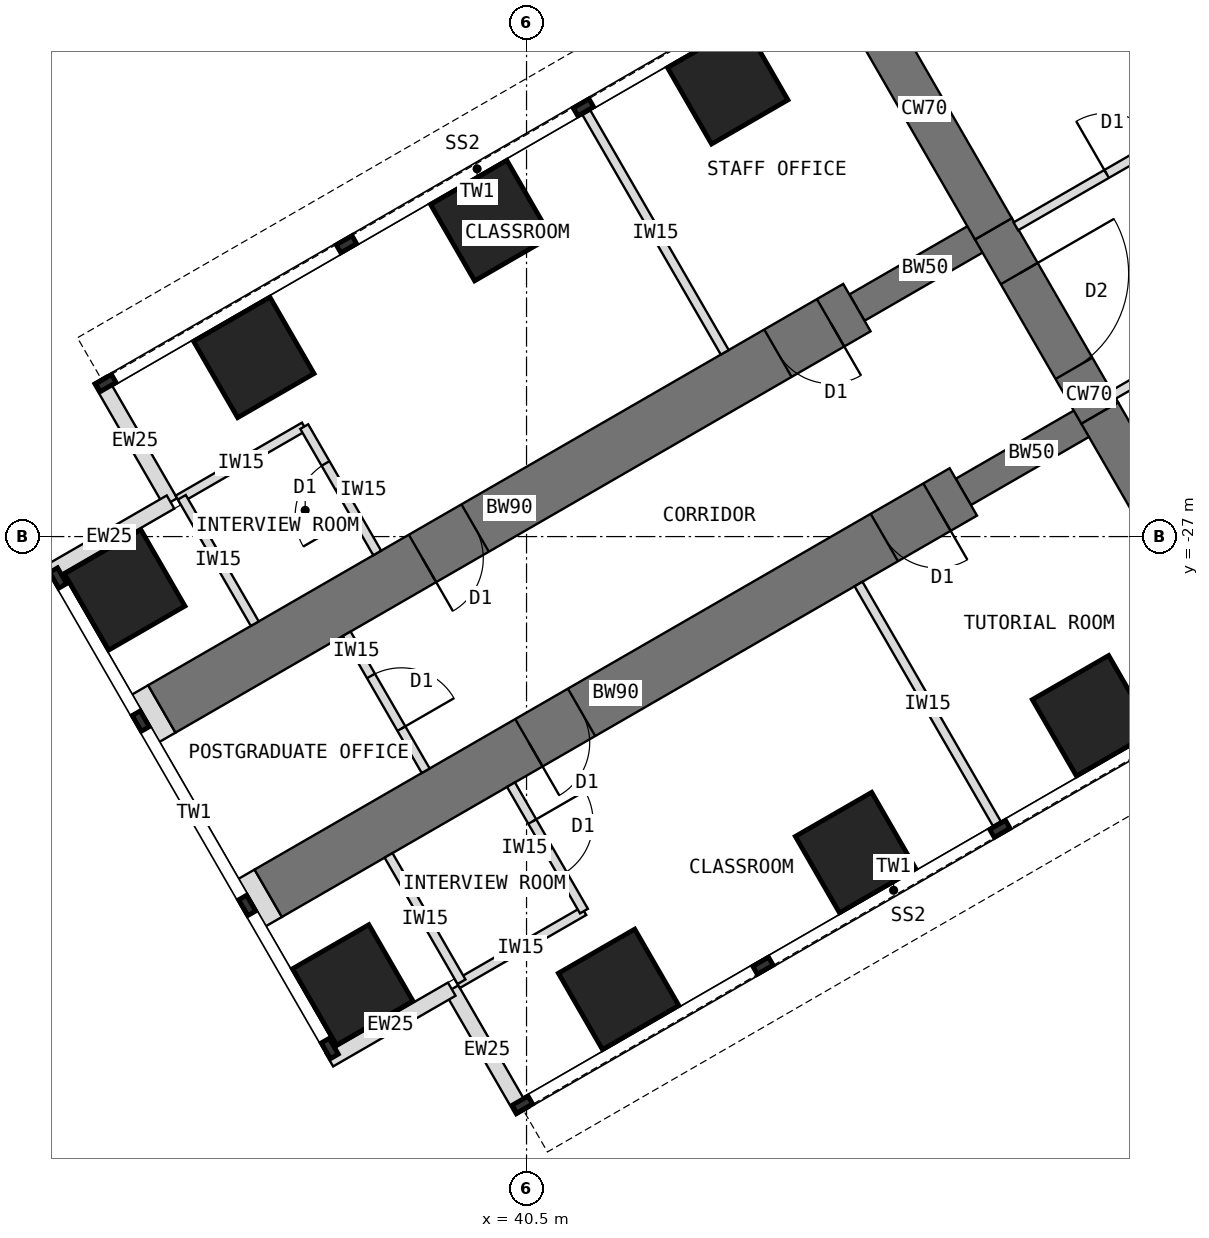
"""IFC4 building model, lengths in metres.
Left out: names, types, materials, properties, quantities, classifications, styles, units other than length and angle.
Written with IfcOpenShell. Run it as: python <this file> out.ifc"""

import sys

from ifc_helpers import new_model, si_unit, direction, frame, frame_2d, origin, origin_2d, place, context, subcontext, project, spatial, rectangle, extrude, element, fill, save


model = new_model("IFC4")
c1 = context("Model", 3, precision=1e-05, world=origin(), true_north=direction((0.0, 1.0)))
c2 = subcontext(c1, "Body", "Model", "MODEL_VIEW")
j1 = project(units=[si_unit("LENGTHUNIT", "METRE"), si_unit("PLANEANGLEUNIT", "RADIAN")], contexts=[c1])
p1 = place(None, origin())
s1 = spatial("IfcSite", under=j1, at=p1, CompositionType="ELEMENT")
p2 = place(p1, origin())
s2 = spatial("IfcBuilding", under=s1, at=p2, CompositionType="ELEMENT")
p3 = place(p2, frame((0.0, 0.0, 56.5)))
s3 = spatial("IfcBuildingStorey", under=s2, at=p3, CompositionType="ELEMENT", Elevation=56.5)
p4 = place(p3, frame((45.904, -18.0, 0.0), z_axis=(0.0, 0.0, 1.0), x_axis=(0.500024481964, -0.866011268655, 0.0)))
e1 = element("IfcWall", 1, at=p4, inside=s3, PredefinedType="SHEAR", context=c2, shape_type="SweptSolid", body=[
    extrude(rectangle(XDim=4.548, YDim=0.7, at=frame_2d((2.274, 0.0))), origin(), (0.0, 0.0, 1.0), 4.0),
])
p5 = place(p3, frame((48.178, -21.939, 0.0), z_axis=(0.0, 0.0, 1.0), x_axis=(0.500010275428, -0.866019471182, 0.0)))
e2 = element("IfcWall", 2, at=p5, inside=s3, PredefinedType="SHEAR", context=c2, shape_type="SweptSolid", body=[
    extrude(rectangle(XDim=3.5, YDim=0.7, at=frame_2d((1.75, 0.0))), origin(), (0.0, 0.0, 1.0), 4.0),
])
p6 = place(p5, frame((0.85, 0.0, 0.0)))
e3 = element("IfcOpeningElement", 3, at=p6, cuts=e2, PredefinedType="OPENING", context=c2, shape_type="SweptSolid", body=[
    extrude(rectangle(XDim=1.8, YDim=2.1, at=frame_2d((0.9, 1.05))), frame((0.0, 0.36, 0.0), z_axis=(0.0, -1.0, 0.0), x_axis=(1.0, 0.0, 0.0)), (0.0, 0.0, 1.0), 0.72),
])
p7 = place(p3, frame((49.928, -24.97, 0.0), z_axis=(0.0, 0.0, 1.0), x_axis=(0.499984222037, -0.866034513004, 0.0)))
e4 = element("IfcWall", 4, at=p7, inside=s3, PredefinedType="SHEAR", context=c2, shape_type="SweptSolid", body=[
    extrude(rectangle(XDim=4.548, YDim=0.7, at=frame_2d((2.274, 0.0))), origin(), (0.0, 0.0, 1.0), 4.0),
])
p8 = place(p3, frame((49.928, -24.97, 0.0), z_axis=(0.0, 0.0, 1.0), x_axis=(-0.866031863473, -0.499988811324, 0.0)))
e5 = element("IfcWall", 5, at=p8, inside=s3, PredefinedType="SHEAR", context=c2, shape_type="SweptSolid", body=[
    extrude(rectangle(XDim=2.592, YDim=0.5, at=frame_2d((1.296, 0.0))), origin(), (0.0, 0.0, 1.0), 4.0),
])
p9 = place(p3, frame((47.684, -26.266, 0.0), z_axis=(0.0, 0.0, 1.0), x_axis=(-0.866027579429, -0.499996231654, 0.0)))
e6 = element("IfcWall", 6, at=p9, inside=s3, PredefinedType="SHEAR", context=c2, shape_type="SweptSolid", body=[
    extrude(rectangle(XDim=13.2, YDim=0.9, at=frame_2d((6.6, 0.0))), origin(), (0.0, 0.0, 1.0), 4.0),
])
p10 = place(p9, frame((0.5, 0.0, 0.0)))
e7 = element("IfcOpeningElement", 7, at=p10, cuts=e6, PredefinedType="OPENING", context=c2, shape_type="SweptSolid", body=[
    extrude(rectangle(XDim=1.0, YDim=2.1, at=frame_2d((0.5, 1.05))), frame((0.0, 0.46, 0.0), z_axis=(0.0, -1.0, 0.0), x_axis=(1.0, 0.0, 0.0)), (0.0, 0.0, 1.0), 0.92),
])
p11 = place(p9, frame((7.25, 0.0, 0.0)))
e8 = element("IfcOpeningElement", 8, at=p11, cuts=e6, PredefinedType="OPENING", context=c2, shape_type="SweptSolid", body=[
    extrude(rectangle(XDim=1.0, YDim=2.1, at=frame_2d((0.5, 1.05))), frame((0.0, 0.46, 0.0), z_axis=(0.0, -1.0, 0.0), x_axis=(1.0, 0.0, 0.0)), (0.0, 0.0, 1.0), 0.92),
])
p12 = place(p3, frame((48.178, -21.939, 0.0), z_axis=(0.0, 0.0, 1.0), x_axis=(-0.866072649678, -0.499918158782, 0.0)))
e9 = element("IfcWall", 9, at=p12, inside=s3, PredefinedType="SHEAR", context=c2, shape_type="SweptSolid", body=[
    extrude(rectangle(XDim=2.592, YDim=0.5, at=frame_2d((1.296, 0.0))), origin(), (0.0, 0.0, 1.0), 4.0),
])
p13 = place(p3, frame((45.934, -23.234, 0.0), z_axis=(0.0, 0.0, 1.0), x_axis=(-0.866019570528, -0.500010103361, 0.0)))
e10 = element("IfcWall", 10, at=p13, inside=s3, PredefinedType="SHEAR", context=c2, shape_type="SweptSolid", body=[
    extrude(rectangle(XDim=13.2, YDim=0.9, at=frame_2d((6.6, 0.0))), origin(), (0.0, 0.0, 1.0), 4.0),
])
p14 = place(p13, frame((0.5, 0.0, 0.0)))
e11 = element("IfcOpeningElement", 11, at=p14, cuts=e10, PredefinedType="OPENING", context=c2, shape_type="SweptSolid", body=[
    extrude(rectangle(XDim=1.0, YDim=2.1, at=frame_2d((0.5, 1.05))), frame((0.0, 0.46, 0.0), z_axis=(0.0, -1.0, 0.0), x_axis=(1.0, 0.0, 0.0)), (0.0, 0.0, 1.0), 0.92),
])
p15 = place(p13, frame((7.25, 0.0, 0.0)))
e12 = element("IfcOpeningElement", 12, at=p15, cuts=e10, PredefinedType="OPENING", context=c2, shape_type="SweptSolid", body=[
    extrude(rectangle(XDim=1.0, YDim=2.1, at=frame_2d((0.5, 1.05))), frame((0.0, 0.46, 0.0), z_axis=(0.0, -1.0, 0.0), x_axis=(1.0, 0.0, 0.0)), (0.0, 0.0, 1.0), 0.92),
])
for number, where, z_axis, x_axis in (
    (13, (49.809, -29.946, 0.0), (0.0, 0.0, 1.0), (0.866, 0.5, 0.0)),
    (14, (43.809, -19.554, 0.0), (0.0, 0.0, 1.0), (0.866, 0.5, 0.0)),
    (15, (45.912, -32.196, 0.0), (0.0, 0.0, 1.0), (0.866, 0.5, 0.0)),
    (16, (39.912, -21.804, 0.0), (0.0, 0.0, 1.0), (0.866, 0.5, 0.0)),
    (17, (42.014, -34.446, 0.0), (0.0, 0.0, 1.0), (0.866, 0.5, 0.0)),
    (18, (36.014, -24.054, 0.0), (0.0, 0.0, 1.0), (0.866, 0.5, 0.0)),
    (19, (37.642, -34.373, 0.0), (0.0, 0.0, 1.0), (0.866, 0.5, 0.0)),
    (20, (33.892, -27.877, 0.0), (0.0, 0.0, 1.0), (0.866, 0.5, 0.0)),
):
    element("IfcColumn", number, at=place(p3, frame(where, z_axis=z_axis, x_axis=x_axis)), inside=s3, PredefinedType="COLUMN", context=c2, shape_type="SweptSolid", body=[
        extrude(rectangle(XDim=1.45, YDim=1.45, at=origin_2d()), origin(), (0.0, 0.0, 1.0), 4.0),
    ])
for number, where, z_axis, x_axis in (
    (21, (40.433, -36.456, 0.0), (0.0, 0.0, 1.0), (-0.5, 0.866, 0.0)),
    (22, (39.27, -34.443, 0.0), (0.0, 0.0, 1.0), (-0.866, -0.5, 0.0)),
    (23, (33.483, -24.419, 0.0), (0.0, 0.0, 1.0), (0.5, -0.866, 0.0)),
    (24, (34.645, -26.432, 0.0), (0.0, 0.0, 1.0), (-0.866, -0.5, 0.0)),
):
    element("IfcWall", number, at=place(p3, frame(where, z_axis=z_axis, x_axis=x_axis)), inside=s3, PredefinedType="STANDARD", context=c2, shape_type="SweptSolid", body=[
        extrude(rectangle(XDim=2.325, YDim=0.25, at=frame_2d((1.163, 0.0))), origin(), (0.0, 0.0, 1.0), 3.8),
    ])
for number, where, z_axis, x_axis in (
    (25, (36.252, -32.865, 0.0), (0.0, 0.0, 1.0), (-0.866, -0.5, 0.0)),
    (26, (34.502, -29.834, 0.0), (0.0, 0.0, 1.0), (-0.866, -0.5, 0.0)),
):
    element("IfcWall", number, at=place(p3, frame(where, z_axis=z_axis, x_axis=x_axis)), inside=s3, PredefinedType="PARTITIONING", context=c2, shape_type="SweptSolid", body=[
        extrude(rectangle(XDim=0.31, YDim=0.9, at=frame_2d((0.155, 0.0))), origin(), (0.0, 0.0, 1.0), 3.8),
    ])
p16 = place(p3, frame((52.38, -19.201, 0.0), z_axis=(0.0, 0.0, 1.0), x_axis=(-0.866023886965, 0.500002627198, 0.0)))
e27 = element("IfcWall", 27, at=p16, inside=s3, PredefinedType="SHEAR", context=c2, shape_type="SweptSolid", body=[
    extrude(rectangle(XDim=5.858, YDim=0.4, at=frame_2d((2.929, 0.0))), origin(), (0.0, 0.0, 1.0), 4.0),
])
p17 = place(p3, frame((45.96, -27.78, 0.0), z_axis=(0.0, 0.0, 1.0), x_axis=(0.499982560684, -0.866035472144, 0.0)))
e28 = element("IfcWall", 28, at=p17, inside=s3, PredefinedType="PARTITIONING", context=c2, shape_type="SweptSolid", body=[
    extrude(rectangle(XDim=4.55, YDim=0.15, at=frame_2d((2.275, 0.0))), origin(), (0.0, 0.0, 1.0), 3.8),
])
p18 = place(p3, frame((41.444, -33.159, 0.0), z_axis=(0.0, 0.0, 1.0), x_axis=(-0.866024647952, -0.500001309137, 0.0)))
e29 = element("IfcWall", 29, at=p18, inside=s3, PredefinedType="PARTITIONING", context=c2, shape_type="SweptSolid", body=[
    extrude(rectangle(XDim=2.4, YDim=0.15, at=frame_2d((1.2, 0.0))), origin(), (0.0, 0.0, 1.0), 3.8),
])
p19 = place(p3, frame((40.244, -31.08, 0.0), z_axis=(0.0, 0.0, 1.0), x_axis=(0.500001309137, -0.866024647952, 0.0)))
e30 = element("IfcWall", 30, at=p19, inside=s3, PredefinedType="PARTITIONING", context=c2, shape_type="SweptSolid", body=[
    extrude(rectangle(XDim=2.4, YDim=0.15, at=frame_2d((1.2, 0.0))), origin(), (0.0, 0.0, 1.0), 3.8),
])
p20 = place(p19, frame((0.7, 0.0, 0.0)))
e31 = element("IfcOpeningElement", 31, at=p20, cuts=e30, PredefinedType="OPENING", context=c2, shape_type="SweptSolid", body=[
    extrude(rectangle(XDim=1.0, YDim=2.1, at=frame_2d((0.5, 1.05))), frame((0.0, 0.085, 0.0), z_axis=(0.0, -1.0, 0.0), x_axis=(1.0, 0.0, 0.0)), (0.0, 0.0, 1.0), 0.17),
])
p21 = place(p3, frame((38.231, -32.243, 0.0), z_axis=(0.0, 0.0, 1.0), x_axis=(0.500033551112, -0.866006032174, 0.0)))
e32 = element("IfcWall", 32, at=p21, inside=s3, PredefinedType="PARTITIONING", context=c2, shape_type="SweptSolid", body=[
    extrude(rectangle(XDim=2.4, YDim=0.15, at=frame_2d((1.2, 0.0))), origin(), (0.0, 0.0, 1.0), 3.8),
])
p22 = place(p3, frame((43.76, -23.97, 0.0), z_axis=(0.0, 0.0, 1.0), x_axis=(-0.499982560684, 0.866035472144, 0.0)))
e33 = element("IfcWall", 33, at=p22, inside=s3, PredefinedType="PARTITIONING", context=c2, shape_type="SweptSolid", body=[
    extrude(rectangle(XDim=4.55, YDim=0.15, at=frame_2d((2.275, 0.0))), origin(), (0.0, 0.0, 1.0), 3.8),
])
p23 = place(p3, frame((36.844, -25.191, 0.0), z_axis=(0.0, 0.0, 1.0), x_axis=(-0.865980596518, -0.500077600433, 0.0)))
e34 = element("IfcWall", 34, at=p23, inside=s3, PredefinedType="PARTITIONING", context=c2, shape_type="SweptSolid", body=[
    extrude(rectangle(XDim=2.4, YDim=0.15, at=frame_2d((1.2, 0.0))), origin(), (0.0, 0.0, 1.0), 3.8),
])
p24 = place(p3, frame((38.044, -27.27, 0.0), z_axis=(0.0, 0.0, 1.0), x_axis=(-0.500033551112, 0.866006032174, 0.0)))
e35 = element("IfcWall", 35, at=p24, inside=s3, PredefinedType="PARTITIONING", context=c2, shape_type="SweptSolid", body=[
    extrude(rectangle(XDim=2.4, YDim=0.15, at=frame_2d((1.2, 0.0))), origin(), (0.0, 0.0, 1.0), 3.8),
])
p25 = place(p24, frame((0.7, 0.0, 0.0)))
e36 = element("IfcOpeningElement", 36, at=p25, cuts=e35, PredefinedType="OPENING", context=c2, shape_type="SweptSolid", body=[
    extrude(rectangle(XDim=1.0, YDim=2.1, at=frame_2d((0.5, 1.05))), frame((0.0, 0.085, 0.0), z_axis=(0.0, -1.0, 0.0), x_axis=(1.0, 0.0, 0.0)), (0.0, 0.0, 1.0), 0.17),
])
p26 = place(p3, frame((36.031, -28.432, 0.0), z_axis=(0.0, 0.0, 1.0), x_axis=(-0.500001309137, 0.866024647952, 0.0)))
e37 = element("IfcWall", 37, at=p26, inside=s3, PredefinedType="PARTITIONING", context=c2, shape_type="SweptSolid", body=[
    extrude(rectangle(XDim=2.4, YDim=0.15, at=frame_2d((1.2, 0.0))), origin(), (0.0, 0.0, 1.0), 3.8),
])
p27 = place(p3, frame((54.017, -22.436, 0.0), z_axis=(0.0, 0.0, 1.0), x_axis=(-0.866015446554, -0.500017246033, 0.0)))
e38 = element("IfcWall", 38, at=p27, inside=s3, PredefinedType="PARTITIONING", context=c2, shape_type="SweptSolid", body=[
    extrude(rectangle(XDim=4.469, YDim=0.15, at=frame_2d((2.234, 0.0))), origin(), (0.0, 0.0, 1.0), 3.8),
])
p28 = place(p27, frame((1.744, 0.0, 0.0)))
e39 = element("IfcOpeningElement", 39, at=p28, cuts=e38, PredefinedType="OPENING", context=c2, shape_type="SweptSolid", body=[
    extrude(rectangle(XDim=1.0, YDim=2.1, at=frame_2d((0.5, 1.05))), frame((0.0, 0.085, 0.0), z_axis=(0.0, -1.0, 0.0), x_axis=(1.0, 0.0, 0.0)), (0.0, 0.0, 1.0), 0.17),
])
p29 = place(p3, frame((48.548, -21.898, 0.0), z_axis=(0.0, 0.0, 1.0), x_axis=(0.866025445582, 0.499999927604, 0.0)))
e40 = element("IfcWall", 40, at=p29, inside=s3, PredefinedType="PARTITIONING", context=c2, shape_type="SweptSolid", body=[
    extrude(rectangle(XDim=4.468, YDim=0.15, at=frame_2d((2.234, 0.0))), origin(), (0.0, 0.0, 1.0), 3.8),
])
p30 = place(p29, frame((1.724, 0.0, 0.0)))
e41 = element("IfcOpeningElement", 41, at=p30, cuts=e40, PredefinedType="OPENING", context=c2, shape_type="SweptSolid", body=[
    extrude(rectangle(XDim=1.0, YDim=2.1, at=frame_2d((0.5, 1.05))), frame((0.0, 0.085, 0.0), z_axis=(0.0, -1.0, 0.0), x_axis=(1.0, 0.0, 0.0)), (0.0, 0.0, 1.0), 0.17),
])
p31 = place(p3, frame((37.542, -28.599, 0.0), z_axis=(0.0, 0.0, 1.0), x_axis=(0.500006934395, -0.866021400173, 0.0)))
e42 = element("IfcWall", 42, at=p31, inside=s3, PredefinedType="PARTITIONING", context=c2, shape_type="SweptSolid", body=[
    extrude(rectangle(XDim=2.6, YDim=0.15, at=frame_2d((1.3, 0.0))), origin(), (0.0, 0.0, 1.0), 3.8),
])
p32 = place(p31, frame((0.8, 0.0, 0.0)))
e43 = element("IfcOpeningElement", 43, at=p32, cuts=e42, PredefinedType="OPENING", context=c2, shape_type="SweptSolid", body=[
    extrude(rectangle(XDim=1.0, YDim=2.1, at=frame_2d((0.5, 1.05))), frame((0.0, 0.085, 0.0), z_axis=(0.0, -1.0, 0.0), x_axis=(1.0, 0.0, 0.0)), (0.0, 0.0, 1.0), 0.17),
])
p33 = place(p6, origin())
e44 = element("IfcDoor", 44, at=p33, inside=s3, OperationType="DOUBLE_DOOR_DOUBLE_SWING", PredefinedType="DOOR", context=c2, shape_type="SweptSolid", body=[
    extrude(rectangle(XDim=1.72, YDim=2.06, at=frame_2d((0.9, 1.03))), frame((0.0, 0.025, 0.0), z_axis=(0.0, -1.0, 0.0), x_axis=(1.0, 0.0, 0.0)), (0.0, 0.0, 1.0), 0.05),
    extrude(rectangle(XDim=0.04, YDim=2.1, at=frame_2d((0.02, 1.05))), frame((0.0, 0.35, 0.0), z_axis=(0.0, -1.0, 0.0), x_axis=(1.0, 0.0, 0.0)), (0.0, 0.0, 1.0), 0.699),
    extrude(rectangle(XDim=0.04, YDim=2.1, at=frame_2d((1.78, 1.05))), frame((0.0, 0.35, 0.0), z_axis=(0.0, -1.0, 0.0), x_axis=(1.0, 0.0, 0.0)), (0.0, 0.0, 1.0), 0.699),
    extrude(rectangle(XDim=1.72, YDim=0.04, at=frame_2d((0.9, 2.08))), frame((0.0, 0.35, 0.0), z_axis=(0.0, -1.0, 0.0), x_axis=(1.0, 0.0, 0.0)), (0.0, 0.0, 1.0), 0.699),
])
fill(e3, e44)
p34 = place(p20, origin())
e45 = element("IfcDoor", 45, at=p34, inside=s3, OperationType="SINGLE_SWING_LEFT", PredefinedType="DOOR", context=c2, shape_type="SweptSolid", body=[
    extrude(rectangle(XDim=1.0, YDim=2.1, at=frame_2d((0.5, 1.05))), frame((0.0, 0.025, 0.0), z_axis=(0.0, -1.0, 0.0), x_axis=(1.0, 0.0, 0.0)), (0.0, 0.0, 1.0), 0.05),
])
fill(e31, e45)
p35 = place(p25, origin())
e46 = element("IfcDoor", 46, at=p35, inside=s3, OperationType="SINGLE_SWING_LEFT", PredefinedType="DOOR", context=c2, shape_type="SweptSolid", body=[
    extrude(rectangle(XDim=1.0, YDim=2.1, at=frame_2d((0.5, 1.05))), frame((0.0, 0.025, 0.0), z_axis=(0.0, -1.0, 0.0), x_axis=(1.0, 0.0, 0.0)), (0.0, 0.0, 1.0), 0.05),
])
fill(e36, e46)
p36 = place(p30, origin())
e47 = element("IfcDoor", 47, at=p36, inside=s3, OperationType="SINGLE_SWING_LEFT", PredefinedType="DOOR", context=c2, shape_type="SweptSolid", body=[
    extrude(rectangle(XDim=1.0, YDim=2.1, at=frame_2d((0.5, 1.05))), frame((0.0, 0.025, 0.0), z_axis=(0.0, -1.0, 0.0), x_axis=(1.0, 0.0, 0.0)), (0.0, 0.0, 1.0), 0.05),
])
fill(e41, e47)
p37 = place(p32, origin())
e48 = element("IfcDoor", 48, at=p37, inside=s3, OperationType="SINGLE_SWING_RIGHT", PredefinedType="DOOR", context=c2, shape_type="SweptSolid", body=[
    extrude(rectangle(XDim=1.0, YDim=2.1, at=frame_2d((0.5, 1.05))), frame((0.0, 0.025, 0.0), z_axis=(0.0, -1.0, 0.0), x_axis=(1.0, 0.0, 0.0)), (0.0, 0.0, 1.0), 0.05),
])
fill(e43, e48)
p38 = place(p10, origin())
e49 = element("IfcDoor", 49, at=p38, inside=s3, OperationType="SINGLE_SWING_LEFT", PredefinedType="DOOR", context=c2, shape_type="SweptSolid", body=[
    extrude(rectangle(XDim=0.92, YDim=2.06, at=frame_2d((0.5, 1.03))), frame((0.0, 0.025, 0.0), z_axis=(0.0, -1.0, 0.0), x_axis=(1.0, 0.0, 0.0)), (0.0, 0.0, 1.0), 0.05),
    extrude(rectangle(XDim=0.04, YDim=2.1, at=frame_2d((0.02, 1.05))), frame((0.0, 0.45, 0.0), z_axis=(0.0, -1.0, 0.0), x_axis=(1.0, 0.0, 0.0)), (0.0, 0.0, 1.0), 0.899),
    extrude(rectangle(XDim=0.04, YDim=2.1, at=frame_2d((0.98, 1.05))), frame((0.0, 0.45, 0.0), z_axis=(0.0, -1.0, 0.0), x_axis=(1.0, 0.0, 0.0)), (0.0, 0.0, 1.0), 0.899),
    extrude(rectangle(XDim=0.92, YDim=0.04, at=frame_2d((0.5, 2.08))), frame((0.0, 0.45, 0.0), z_axis=(0.0, -1.0, 0.0), x_axis=(1.0, 0.0, 0.0)), (0.0, 0.0, 1.0), 0.899),
])
fill(e7, e49)
p39 = place(p11, origin())
e50 = element("IfcDoor", 50, at=p39, inside=s3, OperationType="SINGLE_SWING_RIGHT", PredefinedType="DOOR", context=c2, shape_type="SweptSolid", body=[
    extrude(rectangle(XDim=0.92, YDim=2.06, at=frame_2d((0.5, 1.03))), frame((0.0, 0.025, 0.0), z_axis=(0.0, -1.0, 0.0), x_axis=(1.0, 0.0, 0.0)), (0.0, 0.0, 1.0), 0.05),
    extrude(rectangle(XDim=0.04, YDim=2.1, at=frame_2d((0.02, 1.05))), frame((0.0, 0.45, 0.0), z_axis=(0.0, -1.0, 0.0), x_axis=(1.0, 0.0, 0.0)), (0.0, 0.0, 1.0), 0.899),
    extrude(rectangle(XDim=0.04, YDim=2.1, at=frame_2d((0.98, 1.05))), frame((0.0, 0.45, 0.0), z_axis=(0.0, -1.0, 0.0), x_axis=(1.0, 0.0, 0.0)), (0.0, 0.0, 1.0), 0.899),
    extrude(rectangle(XDim=0.92, YDim=0.04, at=frame_2d((0.5, 2.08))), frame((0.0, 0.45, 0.0), z_axis=(0.0, -1.0, 0.0), x_axis=(1.0, 0.0, 0.0)), (0.0, 0.0, 1.0), 0.899),
])
fill(e8, e50)
p40 = place(p14, origin())
e51 = element("IfcDoor", 51, at=p40, inside=s3, OperationType="SINGLE_SWING_LEFT", PredefinedType="DOOR", context=c2, shape_type="SweptSolid", body=[
    extrude(rectangle(XDim=0.92, YDim=2.06, at=frame_2d((0.5, 1.03))), frame((0.0, 0.025, 0.0), z_axis=(0.0, -1.0, 0.0), x_axis=(1.0, 0.0, 0.0)), (0.0, 0.0, 1.0), 0.05),
    extrude(rectangle(XDim=0.04, YDim=2.1, at=frame_2d((0.02, 1.05))), frame((0.0, 0.45, 0.0), z_axis=(0.0, -1.0, 0.0), x_axis=(1.0, 0.0, 0.0)), (0.0, 0.0, 1.0), 0.899),
    extrude(rectangle(XDim=0.04, YDim=2.1, at=frame_2d((0.98, 1.05))), frame((0.0, 0.45, 0.0), z_axis=(0.0, -1.0, 0.0), x_axis=(1.0, 0.0, 0.0)), (0.0, 0.0, 1.0), 0.899),
    extrude(rectangle(XDim=0.92, YDim=0.04, at=frame_2d((0.5, 2.08))), frame((0.0, 0.45, 0.0), z_axis=(0.0, -1.0, 0.0), x_axis=(1.0, 0.0, 0.0)), (0.0, 0.0, 1.0), 0.899),
])
fill(e11, e51)
p41 = place(p15, origin())
e52 = element("IfcDoor", 52, at=p41, inside=s3, OperationType="SINGLE_SWING_RIGHT", PredefinedType="DOOR", context=c2, shape_type="SweptSolid", body=[
    extrude(rectangle(XDim=0.92, YDim=2.06, at=frame_2d((0.5, 1.03))), frame((0.0, 0.025, 0.0), z_axis=(0.0, -1.0, 0.0), x_axis=(1.0, 0.0, 0.0)), (0.0, 0.0, 1.0), 0.05),
    extrude(rectangle(XDim=0.04, YDim=2.1, at=frame_2d((0.02, 1.05))), frame((0.0, 0.45, 0.0), z_axis=(0.0, -1.0, 0.0), x_axis=(1.0, 0.0, 0.0)), (0.0, 0.0, 1.0), 0.899),
    extrude(rectangle(XDim=0.04, YDim=2.1, at=frame_2d((0.98, 1.05))), frame((0.0, 0.45, 0.0), z_axis=(0.0, -1.0, 0.0), x_axis=(1.0, 0.0, 0.0)), (0.0, 0.0, 1.0), 0.899),
    extrude(rectangle(XDim=0.92, YDim=0.04, at=frame_2d((0.5, 2.08))), frame((0.0, 0.45, 0.0), z_axis=(0.0, -1.0, 0.0), x_axis=(1.0, 0.0, 0.0)), (0.0, 0.0, 1.0), 0.899),
])
fill(e12, e52)
save(model, sys.argv[1])
